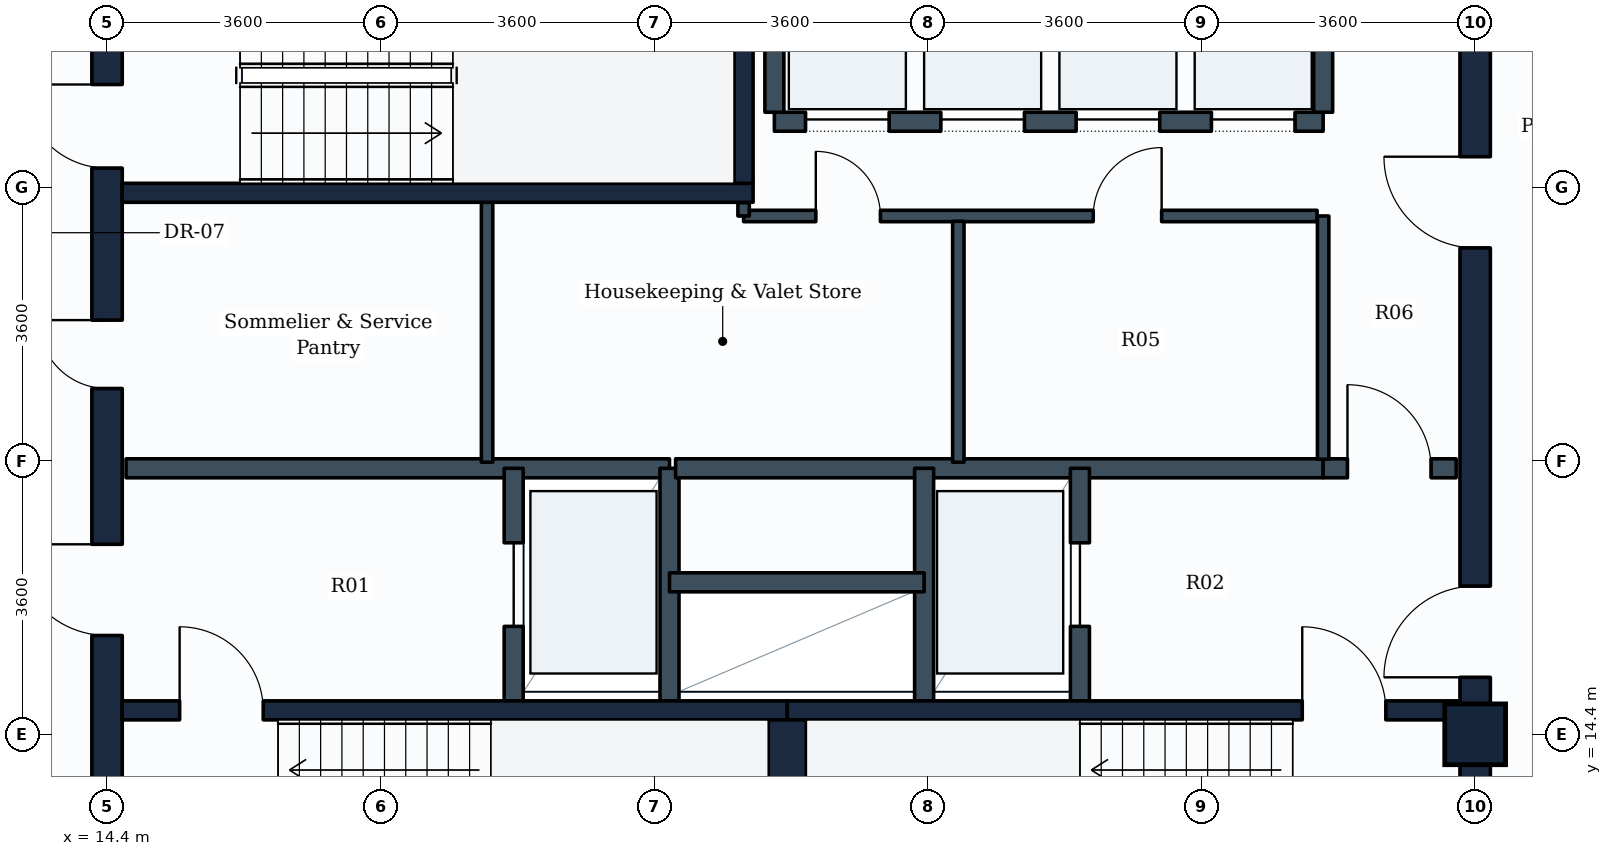
"""IFC4 building model, lengths in metres.
Left out: names, types, materials, properties, quantities, classifications, styles, units other than length and angle.
Written with IfcOpenShell. Run it as: python <this file> out.ifc"""

import sys

from ifc_helpers import new_model, si_unit, direction, frame, frame_2d, origin, origin_2d, place, context, subcontext, project, spatial, rectangle, extrude, element, fill, save


model = new_model("IFC4")
c1 = context("Model", 3, precision=1e-05, world=origin(), true_north=direction((0.0, 1.0)))
c2 = subcontext(c1, "Body", "Model", "MODEL_VIEW")
j1 = project(units=[si_unit("LENGTHUNIT", "METRE"), si_unit("PLANEANGLEUNIT", "RADIAN")], contexts=[c1])
p1 = place(None, origin())
s1 = spatial("IfcSite", under=j1, at=p1, CompositionType="ELEMENT")
p2 = place(p1, origin())
s2 = spatial("IfcBuilding", under=s1, at=p2, CompositionType="ELEMENT")
p3 = place(p2, frame((0.0, 0.0, 239.0)))
s3 = spatial("IfcBuildingStorey", under=s2, at=p3, CompositionType="ELEMENT", Elevation=239.0)
p4 = place(p3, frame((32.4, 14.4, 0.0), z_axis=(0.0, 0.0, 1.0), x_axis=(1.0, 0.0, 0.0)))
e1 = element("IfcColumn", 1, at=p4, inside=s3, PredefinedType="COLUMN", context=c2, shape_type="SweptSolid", body=[
    extrude(rectangle(XDim=0.8, YDim=0.8, at=origin_2d()), origin(), (0.0, 0.0, 1.0), 3.6),
])
p5 = place(p3, frame((14.4, 10.8, 0.0), z_axis=(0.0, 0.0, 1.0), x_axis=(0.0, 1.0, 0.0)))
e2 = element("IfcWall", 2, at=p5, inside=s3, PredefinedType="SHEAR", context=c2, shape_type="SweptSolid", body=[
    extrude(rectangle(XDim=14.4, YDim=0.4, at=frame_2d((7.2, 0.0))), origin(), (0.0, 0.0, 1.0), 3.35),
])
p6 = place(p5, frame((11.05, 0.0, 0.0)))
e3 = element("IfcOpeningElement", 3, at=p6, cuts=e2, PredefinedType="OPENING", context=c2, shape_type="SweptSolid", body=[
    extrude(rectangle(XDim=1.1, YDim=2.1, at=frame_2d((0.55, 1.05))), frame((0.0, 0.21, 0.0), z_axis=(0.0, -1.0, 0.0), x_axis=(1.0, 0.0, 0.0)), (0.0, 0.0, 1.0), 0.42),
])
p7 = place(p5, frame((4.9, 0.0, 0.0)))
e4 = element("IfcOpeningElement", 4, at=p7, cuts=e2, PredefinedType="OPENING", context=c2, shape_type="SweptSolid", body=[
    extrude(rectangle(XDim=1.2, YDim=2.1, at=frame_2d((0.6, 1.05))), frame((0.0, 0.21, 0.0), z_axis=(0.0, -1.0, 0.0), x_axis=(1.0, 0.0, 0.0)), (0.0, 0.0, 1.0), 0.42),
])
p8 = place(p5, frame((8.15, 0.0, 0.0)))
e5 = element("IfcOpeningElement", 5, at=p8, cuts=e2, PredefinedType="OPENING", context=c2, shape_type="SweptSolid", body=[
    extrude(rectangle(XDim=0.9, YDim=2.1, at=frame_2d((0.45, 1.05))), frame((0.0, 0.21, 0.0), z_axis=(0.0, -1.0, 0.0), x_axis=(1.0, 0.0, 0.0)), (0.0, 0.0, 1.0), 0.42),
])
p9 = place(p3, frame((32.4, 10.8, 0.0), z_axis=(0.0, 0.0, 1.0), x_axis=(0.0, 1.0, 0.0)))
e6 = element("IfcWall", 6, at=p9, inside=s3, PredefinedType="SHEAR", context=c2, shape_type="SweptSolid", body=[
    extrude(rectangle(XDim=14.4, YDim=0.4, at=frame_2d((7.2, 0.0))), origin(), (0.0, 0.0, 1.0), 3.35),
])
p10 = place(p9, frame((4.35, 0.0, 0.0)))
e7 = element("IfcOpeningElement", 7, at=p10, cuts=e6, PredefinedType="OPENING", context=c2, shape_type="SweptSolid", body=[
    extrude(rectangle(XDim=1.2, YDim=2.1, at=frame_2d((0.6, 1.05))), frame((0.0, 0.21, 0.0), z_axis=(0.0, -1.0, 0.0), x_axis=(1.0, 0.0, 0.0)), (0.0, 0.0, 1.0), 0.42),
])
p11 = place(p9, frame((10.0, 0.0, 0.0)))
e8 = element("IfcOpeningElement", 8, at=p11, cuts=e6, PredefinedType="OPENING", context=c2, shape_type="SweptSolid", body=[
    extrude(rectangle(XDim=1.2, YDim=2.1, at=frame_2d((0.6, 1.05))), frame((0.0, 0.21, 0.0), z_axis=(0.0, -1.0, 0.0), x_axis=(1.0, 0.0, 0.0)), (0.0, 0.0, 1.0), 0.42),
])
p12 = place(p3, frame((14.6, 14.715, 0.0), z_axis=(0.0, 0.0, 1.0), x_axis=(1.0, 0.0, 0.0)))
e9 = element("IfcWall", 9, at=p12, inside=s3, PredefinedType="SHEAR", context=c2, shape_type="SweptSolid", body=[
    extrude(rectangle(XDim=8.75, YDim=0.25, at=frame_2d((4.375, 0.0))), origin(), (0.0, 0.0, 1.0), 3.35),
])
p13 = place(p12, frame((0.755, 0.0, 0.0)))
e10 = element("IfcOpeningElement", 10, at=p13, cuts=e9, PredefinedType="OPENING", context=c2, shape_type="SweptSolid", body=[
    extrude(rectangle(XDim=1.1, YDim=2.1, at=frame_2d((0.55, 1.05))), frame((0.0, 0.135, 0.0), z_axis=(0.0, -1.0, 0.0), x_axis=(1.0, 0.0, 0.0)), (0.0, 0.0, 1.0), 0.27),
])
p14 = place(p3, frame((23.35, 14.715, 0.0), z_axis=(0.0, 0.0, 1.0), x_axis=(1.0, 0.0, 0.0)))
e11 = element("IfcWall", 11, at=p14, inside=s3, PredefinedType="SHEAR", context=c2, shape_type="SweptSolid", body=[
    extrude(rectangle(XDim=8.85, YDim=0.25, at=frame_2d((4.425, 0.0))), origin(), (0.0, 0.0, 1.0), 3.35),
])
p15 = place(p14, frame((6.775, 0.0, 0.0)))
e12 = element("IfcOpeningElement", 12, at=p15, cuts=e11, PredefinedType="OPENING", context=c2, shape_type="SweptSolid", body=[
    extrude(rectangle(XDim=1.1, YDim=2.1, at=frame_2d((0.55, 1.05))), frame((0.0, 0.135, 0.0), z_axis=(0.0, -1.0, 0.0), x_axis=(1.0, 0.0, 0.0)), (0.0, 0.0, 1.0), 0.27),
])
p16 = place(p3, frame((23.35, 11.75, 0.0), z_axis=(0.0, 0.0, 1.0), x_axis=(0.0, 1.0, 0.0)))
e13 = element("IfcWall", 13, at=p16, inside=s3, PredefinedType="SHEAR", context=c2, shape_type="SweptSolid", body=[
    extrude(rectangle(XDim=2.84, YDim=0.5, at=frame_2d((1.42, 0.0))), origin(), (0.0, 0.0, 1.0), 3.35),
])
p17 = place(p3, frame((14.6, 21.525, 0.0), z_axis=(0.0, 0.0, 1.0), x_axis=(1.0, 0.0, 0.0)))
e14 = element("IfcWall", 14, at=p17, inside=s3, PredefinedType="SHEAR", context=c2, shape_type="SweptSolid", body=[
    extrude(rectangle(XDim=8.3, YDim=0.25, at=frame_2d((4.15, 0.0))), origin(), (0.0, 0.0, 1.0), 3.35),
])
p18 = place(p3, frame((22.775, 21.65, 0.0), z_axis=(0.0, 0.0, 1.0), x_axis=(0.0, 1.0, 0.0)))
e15 = element("IfcWall", 15, at=p18, inside=s3, PredefinedType="SHEAR", context=c2, shape_type="SweptSolid", body=[
    extrude(rectangle(XDim=2.84, YDim=0.25, at=frame_2d((1.42, 0.0))), origin(), (0.0, 0.0, 1.0), 3.35),
])
p19 = place(p3, frame((14.65, 17.9, 0.0), z_axis=(0.0, 0.0, 1.0), x_axis=(1.0, 0.0, 0.0)))
e16 = element("IfcWall", 16, at=p19, inside=s3, PredefinedType="PARTITIONING", context=c2, shape_type="SweptSolid", body=[
    extrude(rectangle(XDim=7.15, YDim=0.25, at=frame_2d((3.575, 0.0))), origin(), (0.0, 0.0, 1.0), 3.335),
])
p20 = place(p3, frame((19.75, 14.84, 0.0), z_axis=(0.0, 0.0, 1.0), x_axis=(0.0, 1.0, 0.0)))
e17 = element("IfcWall", 17, at=p20, inside=s3, PredefinedType="PARTITIONING", context=c2, shape_type="SweptSolid", body=[
    extrude(rectangle(XDim=3.06, YDim=0.25, at=frame_2d((1.53, 0.0))), origin(), (0.0, 0.0, 1.0), 3.335),
])
p21 = place(p20, frame((0.98, 0.0, 0.0)))
e18 = element("IfcOpeningElement", 18, at=p21, cuts=e17, PredefinedType="OPENING", context=c2, shape_type="SweptSolid", body=[
    extrude(rectangle(XDim=1.1, YDim=2.1, at=frame_2d((0.55, 1.05))), frame((0.0, 0.135, 0.0), z_axis=(0.0, -1.0, 0.0), x_axis=(1.0, 0.0, 0.0)), (0.0, 0.0, 1.0), 0.27),
])
p22 = place(p3, frame((21.8, 14.84, 0.0), z_axis=(0.0, 0.0, 1.0), x_axis=(0.0, 1.0, 0.0)))
e19 = element("IfcWall", 19, at=p22, inside=s3, PredefinedType="PARTITIONING", context=c2, shape_type="SweptSolid", body=[
    extrude(rectangle(XDim=3.06, YDim=0.25, at=frame_2d((1.53, 0.0))), origin(), (0.0, 0.0, 1.0), 3.335),
])
p23 = place(p3, frame((21.88, 17.9, 0.0), z_axis=(0.0, 0.0, 1.0), x_axis=(1.0, 0.0, 0.0)))
e20 = element("IfcWall", 20, at=p23, inside=s3, PredefinedType="PARTITIONING", context=c2, shape_type="SweptSolid", body=[
    extrude(rectangle(XDim=8.52, YDim=0.25, at=frame_2d((4.26, 0.0))), origin(), (0.0, 0.0, 1.0), 3.335),
])
p24 = place(p3, frame((30.4, 17.9, 0.0), z_axis=(0.0, 0.0, 1.0), x_axis=(1.0, 0.0, 0.0)))
e21 = element("IfcWall", 21, at=p24, inside=s3, PredefinedType="PARTITIONING", context=c2, shape_type="SweptSolid", body=[
    extrude(rectangle(XDim=1.75, YDim=0.25, at=frame_2d((0.875, 0.0))), origin(), (0.0, 0.0, 1.0), 3.335),
])
p25 = place(p24, frame((0.32, 0.0, 0.0)))
e22 = element("IfcOpeningElement", 22, at=p25, cuts=e21, PredefinedType="OPENING", context=c2, shape_type="SweptSolid", body=[
    extrude(rectangle(XDim=1.1, YDim=2.1, at=frame_2d((0.55, 1.05))), frame((0.0, 0.135, 0.0), z_axis=(0.0, -1.0, 0.0), x_axis=(1.0, 0.0, 0.0)), (0.0, 0.0, 1.0), 0.27),
])
p26 = place(p3, frame((25.15, 14.84, 0.0), z_axis=(0.0, 0.0, 1.0), x_axis=(0.0, 1.0, 0.0)))
e23 = element("IfcWall", 23, at=p26, inside=s3, PredefinedType="PARTITIONING", context=c2, shape_type="SweptSolid", body=[
    extrude(rectangle(XDim=3.06, YDim=0.25, at=frame_2d((1.53, 0.0))), origin(), (0.0, 0.0, 1.0), 3.335),
])
p27 = place(p3, frame((27.2, 14.84, 0.0), z_axis=(0.0, 0.0, 1.0), x_axis=(0.0, 1.0, 0.0)))
e24 = element("IfcWall", 24, at=p27, inside=s3, PredefinedType="PARTITIONING", context=c2, shape_type="SweptSolid", body=[
    extrude(rectangle(XDim=3.06, YDim=0.25, at=frame_2d((1.53, 0.0))), origin(), (0.0, 0.0, 1.0), 3.335),
])
p28 = place(p27, frame((0.98, 0.0, 0.0)))
e25 = element("IfcOpeningElement", 25, at=p28, cuts=e24, PredefinedType="OPENING", context=c2, shape_type="SweptSolid", body=[
    extrude(rectangle(XDim=1.1, YDim=2.1, at=frame_2d((0.55, 1.05))), frame((0.0, 0.135, 0.0), z_axis=(0.0, -1.0, 0.0), x_axis=(1.0, 0.0, 0.0)), (0.0, 0.0, 1.0), 0.27),
])
p29 = place(p3, frame((21.8, 16.4, 0.0), z_axis=(0.0, 0.0, 1.0), x_axis=(1.0, 0.0, 0.0)))
e26 = element("IfcWall", 26, at=p29, inside=s3, PredefinedType="PARTITIONING", context=c2, shape_type="SweptSolid", body=[
    extrude(rectangle(XDim=3.35, YDim=0.25, at=frame_2d((1.675, 0.0))), origin(), (0.0, 0.0, 1.0), 3.335),
])
p30 = place(p3, frame((23.18, 22.46, 0.0), z_axis=(0.0, 0.0, 1.0), x_axis=(1.0, 0.0, 0.0)))
e27 = element("IfcWall", 27, at=p30, inside=s3, PredefinedType="PARTITIONING", context=c2, shape_type="SweptSolid", body=[
    extrude(rectangle(XDim=7.22, YDim=0.25, at=frame_2d((3.61, 0.0))), origin(), (0.0, 0.0, 1.0), 3.335),
])
p31 = place(p30, frame((0.41, 0.0, 0.0)))
e28 = element("IfcOpeningElement", 28, at=p31, cuts=e27, PredefinedType="OPENING", context=c2, shape_type="SweptSolid", body=[
    extrude(rectangle(XDim=1.1, YDim=2.1, at=frame_2d((0.55, 1.05))), frame((0.0, 0.135, 0.0), z_axis=(0.0, -1.0, 0.0), x_axis=(1.0, 0.0, 0.0)), (0.0, 0.0, 1.0), 0.27),
])
p32 = place(p30, frame((2.19, 0.0, 0.0)))
e29 = element("IfcOpeningElement", 29, at=p32, cuts=e27, PredefinedType="OPENING", context=c2, shape_type="SweptSolid", body=[
    extrude(rectangle(XDim=1.1, YDim=2.1, at=frame_2d((0.55, 1.05))), frame((0.0, 0.135, 0.0), z_axis=(0.0, -1.0, 0.0), x_axis=(1.0, 0.0, 0.0)), (0.0, 0.0, 1.0), 0.27),
])
p33 = place(p30, frame((3.97, 0.0, 0.0)))
e30 = element("IfcOpeningElement", 30, at=p33, cuts=e27, PredefinedType="OPENING", context=c2, shape_type="SweptSolid", body=[
    extrude(rectangle(XDim=1.1, YDim=2.1, at=frame_2d((0.55, 1.05))), frame((0.0, 0.135, 0.0), z_axis=(0.0, -1.0, 0.0), x_axis=(1.0, 0.0, 0.0)), (0.0, 0.0, 1.0), 0.27),
])
p34 = place(p30, frame((5.75, 0.0, 0.0)))
e31 = element("IfcOpeningElement", 31, at=p34, cuts=e27, PredefinedType="OPENING", context=c2, shape_type="SweptSolid", body=[
    extrude(rectangle(XDim=1.1, YDim=2.1, at=frame_2d((0.55, 1.05))), frame((0.0, 0.135, 0.0), z_axis=(0.0, -1.0, 0.0), x_axis=(1.0, 0.0, 0.0)), (0.0, 0.0, 1.0), 0.27),
])
for number, where, z_axis, x_axis in (
    (32, (23.18, 22.585, 0.0), (0.0, 0.0, 1.0), (0.0, 1.0, 0.0)),
    (33, (30.4, 22.585, 0.0), (0.0, 0.0, 1.0), (0.0, 1.0, 0.0)),
):
    element("IfcWall", number, at=place(p3, frame(where, z_axis=z_axis, x_axis=x_axis)), inside=s3, PredefinedType="PARTITIONING", context=c2, shape_type="SweptSolid", body=[
        extrude(rectangle(XDim=2.315, YDim=0.25, at=frame_2d((1.157, 0.0))), origin(), (0.0, 0.0, 1.0), 3.335),
    ])
p35 = place(p3, frame((22.775, 21.22, 0.0), z_axis=(0.0, 0.0, 1.0), x_axis=(1.0, 0.0, 0.0)))
e34 = element("IfcWall", 34, at=p35, inside=s3, PredefinedType="PARTITIONING", context=c2, shape_type="SweptSolid", body=[
    extrude(rectangle(XDim=7.545, YDim=0.15, at=frame_2d((3.772, 0.0))), origin(), (0.0, 0.0, 1.0), 3.335),
])
p36 = place(p35, frame((0.95, 0.0, 0.0)))
e35 = element("IfcOpeningElement", 35, at=p36, cuts=e34, PredefinedType="OPENING", context=c2, shape_type="SweptSolid", body=[
    extrude(rectangle(XDim=0.85, YDim=2.1, at=frame_2d((0.425, 1.05))), frame((0.0, 0.085, 0.0), z_axis=(0.0, -1.0, 0.0), x_axis=(1.0, 0.0, 0.0)), (0.0, 0.0, 1.0), 0.17),
])
p37 = place(p35, frame((4.6, 0.0, 0.0)))
e36 = element("IfcOpeningElement", 36, at=p37, cuts=e34, PredefinedType="OPENING", context=c2, shape_type="SweptSolid", body=[
    extrude(rectangle(XDim=0.9, YDim=2.1, at=frame_2d((0.45, 1.05))), frame((0.0, 0.085, 0.0), z_axis=(0.0, -1.0, 0.0), x_axis=(1.0, 0.0, 0.0)), (0.0, 0.0, 1.0), 0.17),
])
p38 = place(p3, frame((22.775, 21.22, 0.0), z_axis=(0.0, 0.0, 1.0), x_axis=(0.0, 1.0, 0.0)))
e37 = element("IfcWall", 37, at=p38, inside=s3, PredefinedType="PARTITIONING", context=c2, shape_type="SweptSolid", body=[
    extrude(rectangle(XDim=0.175, YDim=0.15, at=frame_2d((0.087, 0.0))), origin(), (0.0, 0.0, 1.0), 3.335),
])
p39 = place(p3, frame((30.4, 18.02, 0.0), z_axis=(0.0, 0.0, 1.0), x_axis=(0.0, 1.0, 0.0)))
e38 = element("IfcWall", 38, at=p39, inside=s3, PredefinedType="PARTITIONING", context=c2, shape_type="SweptSolid", body=[
    extrude(rectangle(XDim=3.2, YDim=0.15, at=frame_2d((1.6, 0.0))), origin(), (0.0, 0.0, 1.0), 3.335),
])
p40 = place(p3, frame((19.4, 17.98, 0.0), z_axis=(0.0, 0.0, 1.0), x_axis=(0.0, 1.0, 0.0)))
e39 = element("IfcWall", 39, at=p40, inside=s3, PredefinedType="PARTITIONING", context=c2, shape_type="SweptSolid", body=[
    extrude(rectangle(XDim=3.42, YDim=0.15, at=frame_2d((1.71, 0.0))), origin(), (0.0, 0.0, 1.0), 3.335),
])
p41 = place(p3, frame((25.6, 17.98, 0.0), z_axis=(0.0, 0.0, 1.0), x_axis=(0.0, 1.0, 0.0)))
e40 = element("IfcWall", 40, at=p41, inside=s3, PredefinedType="PARTITIONING", context=c2, shape_type="SweptSolid", body=[
    extrude(rectangle(XDim=3.17, YDim=0.15, at=frame_2d((1.585, 0.0))), origin(), (0.0, 0.0, 1.0), 3.335),
])
p42 = place(p13, origin())
e41 = element("IfcDoor", 41, at=p42, inside=s3, OperationType="SINGLE_SWING_LEFT", PredefinedType="DOOR", context=c2, shape_type="SweptSolid", body=[
    extrude(rectangle(XDim=1.1, YDim=2.1, at=frame_2d((0.55, 1.05))), frame((0.0, 0.025, 0.0), z_axis=(0.0, -1.0, 0.0), x_axis=(1.0, 0.0, 0.0)), (0.0, 0.0, 1.0), 0.05),
])
fill(e10, e41)
p43 = place(p15, origin())
e42 = element("IfcDoor", 42, at=p43, inside=s3, OperationType="SINGLE_SWING_LEFT", PredefinedType="DOOR", context=c2, shape_type="SweptSolid", body=[
    extrude(rectangle(XDim=1.1, YDim=2.1, at=frame_2d((0.55, 1.05))), frame((0.0, 0.025, 0.0), z_axis=(0.0, -1.0, 0.0), x_axis=(1.0, 0.0, 0.0)), (0.0, 0.0, 1.0), 0.05),
])
fill(e12, e42)
p44 = place(p6, origin())
e43 = element("IfcDoor", 43, at=p44, inside=s3, OperationType="SINGLE_SWING_RIGHT", PredefinedType="DOOR", context=c2, shape_type="SweptSolid", body=[
    extrude(rectangle(XDim=1.1, YDim=2.1, at=frame_2d((0.55, 1.05))), frame((0.0, 0.025, 0.0), z_axis=(0.0, -1.0, 0.0), x_axis=(1.0, 0.0, 0.0)), (0.0, 0.0, 1.0), 0.05),
])
fill(e3, e43)
p45 = place(p21, origin())
e44 = element("IfcDoor", 44, at=p45, inside=s3, OperationType="SLIDING_TO_LEFT", PredefinedType="DOOR", context=c2, shape_type="SweptSolid", body=[
    extrude(rectangle(XDim=1.1, YDim=2.1, at=frame_2d((0.55, 1.05))), frame((0.0, 0.025, 0.0), z_axis=(0.0, -1.0, 0.0), x_axis=(1.0, 0.0, 0.0)), (0.0, 0.0, 1.0), 0.05),
])
fill(e18, e44)
p46 = place(p28, origin())
e45 = element("IfcDoor", 45, at=p46, inside=s3, OperationType="SLIDING_TO_LEFT", PredefinedType="DOOR", context=c2, shape_type="SweptSolid", body=[
    extrude(rectangle(XDim=1.1, YDim=2.1, at=frame_2d((0.55, 1.05))), frame((0.0, 0.025, 0.0), z_axis=(0.0, -1.0, 0.0), x_axis=(1.0, 0.0, 0.0)), (0.0, 0.0, 1.0), 0.05),
])
fill(e25, e45)
p47 = place(p7, origin())
e46 = element("IfcDoor", 46, at=p47, inside=s3, OperationType="SINGLE_SWING_RIGHT", PredefinedType="DOOR", context=c2, shape_type="SweptSolid", body=[
    extrude(rectangle(XDim=1.2, YDim=2.1, at=frame_2d((0.6, 1.05))), frame((0.0, 0.025, 0.0), z_axis=(0.0, -1.0, 0.0), x_axis=(1.0, 0.0, 0.0)), (0.0, 0.0, 1.0), 0.05),
])
fill(e4, e46)
p48 = place(p10, origin())
e47 = element("IfcDoor", 47, at=p48, inside=s3, OperationType="SINGLE_SWING_LEFT", PredefinedType="DOOR", context=c2, shape_type="SweptSolid", body=[
    extrude(rectangle(XDim=1.2, YDim=2.1, at=frame_2d((0.6, 1.05))), frame((0.0, 0.025, 0.0), z_axis=(0.0, -1.0, 0.0), x_axis=(1.0, 0.0, 0.0)), (0.0, 0.0, 1.0), 0.05),
])
fill(e7, e47)
p49 = place(p25, origin())
e48 = element("IfcDoor", 48, at=p49, inside=s3, OperationType="SINGLE_SWING_LEFT", PredefinedType="DOOR", context=c2, shape_type="SweptSolid", body=[
    extrude(rectangle(XDim=1.1, YDim=2.1, at=frame_2d((0.55, 1.05))), frame((0.0, 0.025, 0.0), z_axis=(0.0, -1.0, 0.0), x_axis=(1.0, 0.0, 0.0)), (0.0, 0.0, 1.0), 0.05),
])
fill(e22, e48)
p50 = place(p31, origin())
e49 = element("IfcDoor", 49, at=p50, inside=s3, OperationType="SLIDING_TO_LEFT", PredefinedType="DOOR", context=c2, shape_type="SweptSolid", body=[
    extrude(rectangle(XDim=1.1, YDim=2.1, at=frame_2d((0.55, 1.05))), frame((0.0, 0.025, 0.0), z_axis=(0.0, -1.0, 0.0), x_axis=(1.0, 0.0, 0.0)), (0.0, 0.0, 1.0), 0.05),
])
fill(e28, e49)
p51 = place(p32, origin())
e50 = element("IfcDoor", 50, at=p51, inside=s3, OperationType="SLIDING_TO_LEFT", PredefinedType="DOOR", context=c2, shape_type="SweptSolid", body=[
    extrude(rectangle(XDim=1.1, YDim=2.1, at=frame_2d((0.55, 1.05))), frame((0.0, 0.025, 0.0), z_axis=(0.0, -1.0, 0.0), x_axis=(1.0, 0.0, 0.0)), (0.0, 0.0, 1.0), 0.05),
])
fill(e29, e50)
p52 = place(p33, origin())
e51 = element("IfcDoor", 51, at=p52, inside=s3, OperationType="SLIDING_TO_LEFT", PredefinedType="DOOR", context=c2, shape_type="SweptSolid", body=[
    extrude(rectangle(XDim=1.1, YDim=2.1, at=frame_2d((0.55, 1.05))), frame((0.0, 0.025, 0.0), z_axis=(0.0, -1.0, 0.0), x_axis=(1.0, 0.0, 0.0)), (0.0, 0.0, 1.0), 0.05),
])
fill(e30, e51)
p53 = place(p34, origin())
e52 = element("IfcDoor", 52, at=p53, inside=s3, OperationType="SLIDING_TO_LEFT", PredefinedType="DOOR", context=c2, shape_type="SweptSolid", body=[
    extrude(rectangle(XDim=1.1, YDim=2.1, at=frame_2d((0.55, 1.05))), frame((0.0, 0.025, 0.0), z_axis=(0.0, -1.0, 0.0), x_axis=(1.0, 0.0, 0.0)), (0.0, 0.0, 1.0), 0.05),
])
fill(e31, e52)
p54 = place(p11, origin())
e53 = element("IfcDoor", 53, at=p54, inside=s3, OperationType="SINGLE_SWING_RIGHT", PredefinedType="DOOR", context=c2, shape_type="SweptSolid", body=[
    extrude(rectangle(XDim=1.2, YDim=2.1, at=frame_2d((0.6, 1.05))), frame((0.0, 0.025, 0.0), z_axis=(0.0, -1.0, 0.0), x_axis=(1.0, 0.0, 0.0)), (0.0, 0.0, 1.0), 0.05),
])
fill(e8, e53)
p55 = place(p8, origin())
e54 = element("IfcDoor", 54, at=p55, inside=s3, OperationType="SINGLE_SWING_RIGHT", PredefinedType="DOOR", context=c2, shape_type="SweptSolid", body=[
    extrude(rectangle(XDim=0.9, YDim=2.1, at=frame_2d((0.45, 1.05))), frame((0.0, 0.025, 0.0), z_axis=(0.0, -1.0, 0.0), x_axis=(1.0, 0.0, 0.0)), (0.0, 0.0, 1.0), 0.05),
])
fill(e5, e54)
p56 = place(p36, origin())
e55 = element("IfcDoor", 55, at=p56, inside=s3, OperationType="SINGLE_SWING_LEFT", PredefinedType="DOOR", context=c2, shape_type="SweptSolid", body=[
    extrude(rectangle(XDim=0.85, YDim=2.1, at=frame_2d((0.425, 1.05))), frame((0.0, 0.025, 0.0), z_axis=(0.0, -1.0, 0.0), x_axis=(1.0, 0.0, 0.0)), (0.0, 0.0, 1.0), 0.05),
])
fill(e35, e55)
p57 = place(p37, origin())
e56 = element("IfcDoor", 56, at=p57, inside=s3, OperationType="SINGLE_SWING_RIGHT", PredefinedType="DOOR", context=c2, shape_type="SweptSolid", body=[
    extrude(rectangle(XDim=0.9, YDim=2.1, at=frame_2d((0.45, 1.05))), frame((0.0, 0.025, 0.0), z_axis=(0.0, -1.0, 0.0), x_axis=(1.0, 0.0, 0.0)), (0.0, 0.0, 1.0), 0.05),
])
fill(e36, e56)
save(model, sys.argv[1])
